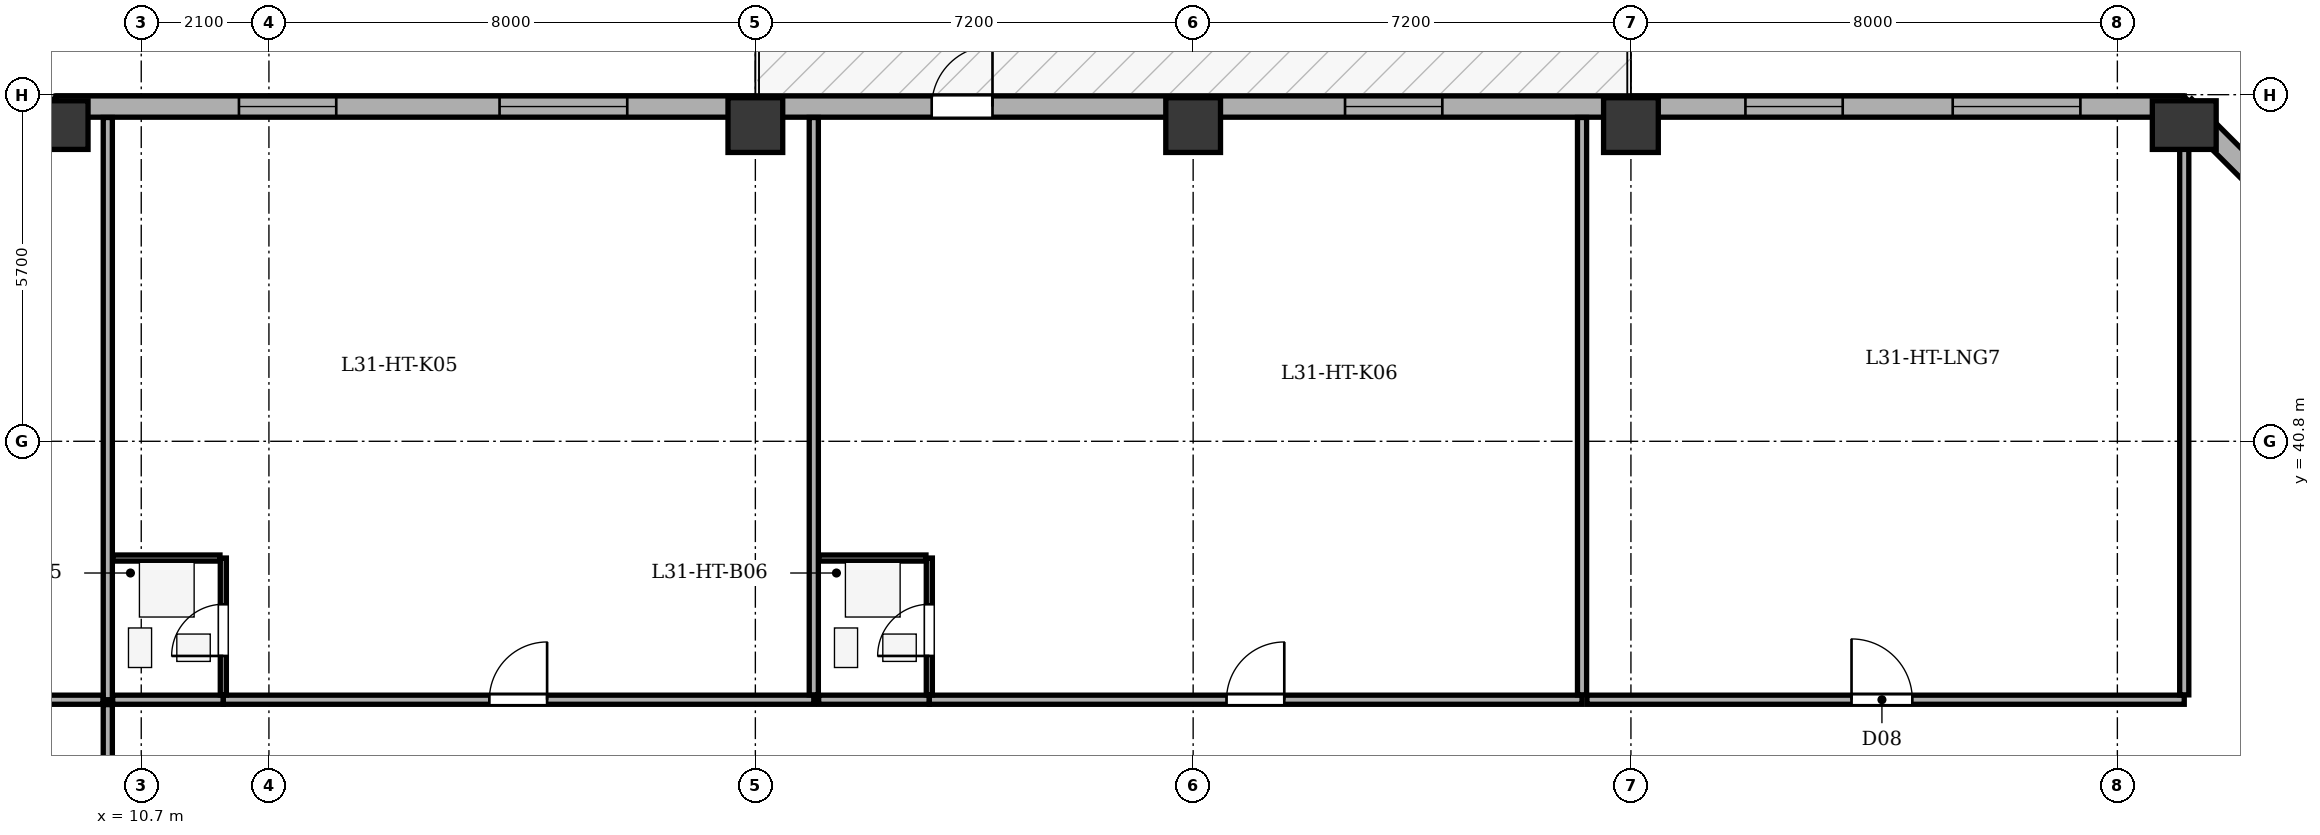
"""IFC4 building model, lengths in metres.
Left out: names, types, materials, properties, quantities, classifications, styles, units other than length and angle.
Written with IfcOpenShell. Run it as: python <this file> out.ifc"""

import sys

from ifc_helpers import new_model, si_unit, direction, frame, frame_2d, origin, origin_2d, place, context, subcontext, project, spatial, rectangle, extrude, element, fill, save


model = new_model("IFC4")
c1 = context("Model", 3, precision=1e-05, world=origin(), true_north=direction((0.0, 1.0)))
c2 = subcontext(c1, "Body", "Model", "MODEL_VIEW")
j1 = project(units=[si_unit("LENGTHUNIT", "METRE"), si_unit("PLANEANGLEUNIT", "RADIAN")], contexts=[c1])
p1 = place(None, origin())
s1 = spatial("IfcSite", under=j1, at=p1, CompositionType="ELEMENT")
p2 = place(p1, origin())
s2 = spatial("IfcBuilding", under=s1, at=p2, CompositionType="ELEMENT")
p3 = place(p2, frame((0.0, 0.0, 127.3)))
s3 = spatial("IfcBuildingStorey", under=s2, at=p3, CompositionType="ELEMENT", Elevation=127.3)
p4 = place(p3, frame((9.3, 46.0, 0.0), z_axis=(0.0, 0.0, 1.0), x_axis=(1.0, 0.0, 0.0)))
e1 = element("IfcColumn", 1, at=p4, inside=s3, PredefinedType="COLUMN", context=c2, shape_type="SweptSolid", body=[
    extrude(rectangle(XDim=0.8, YDim=1.05, at=origin_2d()), origin(), (0.0, 0.0, 1.0), 3.5),
])
for number, where, z_axis, x_axis in (
    (2, (20.8, 46.0, 0.0), (0.0, 0.0, 1.0), (1.0, 0.0, 0.0)),
    (3, (28.0, 46.0, 0.0), (0.0, 0.0, 1.0), (1.0, 0.0, 0.0)),
    (4, (35.2, 46.0, 0.0), (0.0, 0.0, 1.0), (1.0, 0.0, 0.0)),
):
    element("IfcColumn", number, at=place(p3, frame(where, z_axis=z_axis, x_axis=x_axis)), inside=s3, PredefinedType="COLUMN", context=c2, shape_type="SweptSolid", body=[
        extrude(rectangle(XDim=0.9, YDim=0.9, at=origin_2d()), origin(), (0.0, 0.0, 1.0), 3.5),
    ])
p5 = place(p3, frame((44.3, 46.0, 0.0), z_axis=(0.0, 0.0, 1.0), x_axis=(1.0, 0.0, 0.0)))
e5 = element("IfcColumn", 5, at=p5, inside=s3, PredefinedType="COLUMN", context=c2, shape_type="SweptSolid", body=[
    extrude(rectangle(XDim=0.8, YDim=1.05, at=origin_2d()), origin(), (0.0, 0.0, 1.0), 3.5),
])
p6 = place(p3, frame((4.495, 41.5, 0.0), z_axis=(0.0, 0.0, 1.0), x_axis=(0.707106781187, 0.707106781187, 0.0)))
e6 = element("IfcWall", 6, at=p6, inside=s3, PredefinedType="STANDARD", context=c2, shape_type="SweptSolid", body=[
    extrude(rectangle(XDim=6.795, YDim=0.35, at=frame_2d((3.397, 0.0))), origin(), (0.0, 0.0, 1.0), 2.785),
])
p7 = place(p6, frame((2.698, 0.0, 0.75)))
e7 = element("IfcOpeningElement", 7, at=p7, cuts=e6, PredefinedType="OPENING", context=c2, shape_type="SweptSolid", body=[
    extrude(rectangle(XDim=1.4, YDim=1.65, at=frame_2d((0.7, 0.825))), frame((0.0, 0.185, 0.0), z_axis=(0.0, -1.0, 0.0), x_axis=(1.0, 0.0, 0.0)), (0.0, 0.0, 1.0), 0.37),
])
p8 = place(p3, frame((9.3, 46.305, 0.0), z_axis=(0.0, 0.0, 1.0), x_axis=(1.0, 0.0, 0.0)))
e8 = element("IfcWall", 8, at=p8, inside=s3, PredefinedType="STANDARD", context=c2, shape_type="SweptSolid", body=[
    extrude(rectangle(XDim=35.0, YDim=0.35, at=frame_2d((17.5, 0.0))), origin(), (0.0, 0.0, 1.0), 2.785),
])
p9 = place(p8, frame((14.4, 0.0, 0.0)))
e9 = element("IfcOpeningElement", 9, at=p9, cuts=e8, PredefinedType="OPENING", context=c2, shape_type="SweptSolid", body=[
    extrude(rectangle(XDim=1.0, YDim=2.02, at=frame_2d((0.5, 1.01))), frame((0.0, 0.185, 0.0), z_axis=(0.0, -1.0, 0.0), x_axis=(1.0, 0.0, 0.0)), (0.0, 0.0, 1.0), 0.37),
])
p10 = place(p8, frame((3.007, 0.0, 0.75)))
e10 = element("IfcOpeningElement", 10, at=p10, cuts=e8, PredefinedType="OPENING", context=c2, shape_type="SweptSolid", body=[
    extrude(rectangle(XDim=1.6, YDim=1.75, at=frame_2d((0.8, 0.875))), frame((0.0, 0.185, 0.0), z_axis=(0.0, -1.0, 0.0), x_axis=(1.0, 0.0, 0.0)), (0.0, 0.0, 1.0), 0.37),
])
p11 = place(p8, frame((7.293, 0.0, 0.75)))
e11 = element("IfcOpeningElement", 11, at=p11, cuts=e8, PredefinedType="OPENING", context=c2, shape_type="SweptSolid", body=[
    extrude(rectangle(XDim=2.1, YDim=1.75, at=frame_2d((1.05, 0.875))), frame((0.0, 0.185, 0.0), z_axis=(0.0, -1.0, 0.0), x_axis=(1.0, 0.0, 0.0)), (0.0, 0.0, 1.0), 0.37),
])
p12 = place(p8, frame((21.198, 0.0, 0.75)))
e12 = element("IfcOpeningElement", 12, at=p12, cuts=e8, PredefinedType="OPENING", context=c2, shape_type="SweptSolid", body=[
    extrude(rectangle(XDim=1.6, YDim=1.75, at=frame_2d((0.8, 0.875))), frame((0.0, 0.185, 0.0), z_axis=(0.0, -1.0, 0.0), x_axis=(1.0, 0.0, 0.0)), (0.0, 0.0, 1.0), 0.37),
])
p13 = place(p8, frame((27.783, 0.0, 0.75)))
e13 = element("IfcOpeningElement", 13, at=p13, cuts=e8, PredefinedType="OPENING", context=c2, shape_type="SweptSolid", body=[
    extrude(rectangle(XDim=1.6, YDim=1.75, at=frame_2d((0.8, 0.875))), frame((0.0, 0.185, 0.0), z_axis=(0.0, -1.0, 0.0), x_axis=(1.0, 0.0, 0.0)), (0.0, 0.0, 1.0), 0.37),
])
p14 = place(p8, frame((31.192, 0.0, 0.75)))
e14 = element("IfcOpeningElement", 14, at=p14, cuts=e8, PredefinedType="OPENING", context=c2, shape_type="SweptSolid", body=[
    extrude(rectangle(XDim=2.1, YDim=1.75, at=frame_2d((1.05, 0.875))), frame((0.0, 0.185, 0.0), z_axis=(0.0, -1.0, 0.0), x_axis=(1.0, 0.0, 0.0)), (0.0, 0.0, 1.0), 0.37),
])
p15 = place(p3, frame((44.3, 46.305, 0.0), z_axis=(0.0, 0.0, 1.0), x_axis=(0.707106781187, -0.707106781187, 0.0)))
e15 = element("IfcWall", 15, at=p15, inside=s3, PredefinedType="STANDARD", context=c2, shape_type="SweptSolid", body=[
    extrude(rectangle(XDim=6.795, YDim=0.35, at=frame_2d((3.397, 0.0))), origin(), (0.0, 0.0, 1.0), 2.785),
])
p16 = place(p15, frame((2.698, 0.0, 0.75)))
e16 = element("IfcOpeningElement", 16, at=p16, cuts=e15, PredefinedType="OPENING", context=c2, shape_type="SweptSolid", body=[
    extrude(rectangle(XDim=1.4, YDim=1.65, at=frame_2d((0.7, 0.825))), frame((0.0, 0.185, 0.0), z_axis=(0.0, -1.0, 0.0), x_axis=(1.0, 0.0, 0.0)), (0.0, 0.0, 1.0), 0.37),
])
p17 = place(p3, frame((10.15, 36.55, 0.0), z_axis=(0.0, 0.0, 1.0), x_axis=(0.0, 1.0, 0.0)))
e17 = element("IfcWall", 17, at=p17, inside=s3, PredefinedType="PARTITIONING", context=c2, shape_type="SweptSolid", body=[
    extrude(rectangle(XDim=9.575, YDim=0.15, at=frame_2d((4.788, 0.0))), origin(), (0.0, 0.0, 1.0), 3.2),
])
p18 = place(p3, frame((10.23, 36.55, 0.0), z_axis=(0.0, 0.0, 1.0), x_axis=(1.0, 0.0, 0.0)))
e18 = element("IfcWall", 18, at=p18, inside=s3, PredefinedType="PARTITIONING", context=c2, shape_type="SweptSolid", body=[
    extrude(rectangle(XDim=1.82, YDim=0.15, at=frame_2d((0.91, 0.0))), origin(), (0.0, 0.0, 1.0), 3.2),
])
p19 = place(p3, frame((12.05, 36.55, 0.0), z_axis=(0.0, 0.0, 1.0), x_axis=(1.0, 0.0, 0.0)))
e19 = element("IfcWall", 19, at=p19, inside=s3, PredefinedType="PARTITIONING", context=c2, shape_type="SweptSolid", body=[
    extrude(rectangle(XDim=9.711, YDim=0.15, at=frame_2d((4.855, 0.0))), origin(), (0.0, 0.0, 1.0), 3.2),
])
p20 = place(p19, frame((4.375, 0.0, 0.0)))
e20 = element("IfcOpeningElement", 20, at=p20, cuts=e19, PredefinedType="OPENING", context=c2, shape_type="SweptSolid", body=[
    extrude(rectangle(XDim=0.95, YDim=2.1, at=frame_2d((0.475, 1.05))), frame((0.0, 0.085, 0.0), z_axis=(0.0, -1.0, 0.0), x_axis=(1.0, 0.0, 0.0)), (0.0, 0.0, 1.0), 0.17),
])
p21 = place(p3, frame((12.05, 36.63, 0.0), z_axis=(0.0, 0.0, 1.0), x_axis=(0.0, 1.0, 0.0)))
e21 = element("IfcWall", 21, at=p21, inside=s3, PredefinedType="PARTITIONING", context=c2, shape_type="SweptSolid", body=[
    extrude(rectangle(XDim=2.25, YDim=0.1, at=frame_2d((1.125, 0.0))), origin(), (0.0, 0.0, 1.0), 3.2),
])
p22 = place(p21, frame((0.64, 0.0, 0.0)))
e22 = element("IfcOpeningElement", 22, at=p22, cuts=e21, PredefinedType="OPENING", context=c2, shape_type="SweptSolid", body=[
    extrude(rectangle(XDim=0.85, YDim=2.05, at=frame_2d((0.425, 1.025))), frame((0.0, 0.06, 0.0), z_axis=(0.0, -1.0, 0.0), x_axis=(1.0, 0.0, 0.0)), (0.0, 0.0, 1.0), 0.12),
])
p23 = place(p3, frame((10.23, 38.88, 0.0), z_axis=(0.0, 0.0, 1.0), x_axis=(1.0, 0.0, 0.0)))
e23 = element("IfcWall", 23, at=p23, inside=s3, PredefinedType="PARTITIONING", context=c2, shape_type="SweptSolid", body=[
    extrude(rectangle(XDim=1.765, YDim=0.1, at=frame_2d((0.883, 0.0))), origin(), (0.0, 0.0, 1.0), 3.2),
])
p24 = place(p3, frame((21.761, 36.63, 0.0), z_axis=(0.0, 0.0, 1.0), x_axis=(0.0, 1.0, 0.0)))
e24 = element("IfcWall", 24, at=p24, inside=s3, PredefinedType="PARTITIONING", context=c2, shape_type="SweptSolid", body=[
    extrude(rectangle(XDim=9.495, YDim=0.15, at=frame_2d((4.748, 0.0))), origin(), (0.0, 0.0, 1.0), 3.2),
])
p25 = place(p3, frame((21.841, 36.55, 0.0), z_axis=(0.0, 0.0, 1.0), x_axis=(1.0, 0.0, 0.0)))
e25 = element("IfcWall", 25, at=p25, inside=s3, PredefinedType="PARTITIONING", context=c2, shape_type="SweptSolid", body=[
    extrude(rectangle(XDim=1.82, YDim=0.15, at=frame_2d((0.91, 0.0))), origin(), (0.0, 0.0, 1.0), 3.2),
])
p26 = place(p3, frame((23.661, 36.55, 0.0), z_axis=(0.0, 0.0, 1.0), x_axis=(1.0, 0.0, 0.0)))
e26 = element("IfcWall", 26, at=p26, inside=s3, PredefinedType="PARTITIONING", context=c2, shape_type="SweptSolid", body=[
    extrude(rectangle(XDim=10.735, YDim=0.15, at=frame_2d((5.368, 0.0))), origin(), (0.0, 0.0, 1.0), 3.2),
])
p27 = place(p26, frame((4.888, 0.0, 0.0)))
e27 = element("IfcOpeningElement", 27, at=p27, cuts=e26, PredefinedType="OPENING", context=c2, shape_type="SweptSolid", body=[
    extrude(rectangle(XDim=0.95, YDim=2.1, at=frame_2d((0.475, 1.05))), frame((0.0, 0.085, 0.0), z_axis=(0.0, -1.0, 0.0), x_axis=(1.0, 0.0, 0.0)), (0.0, 0.0, 1.0), 0.17),
])
p28 = place(p3, frame((23.661, 36.63, 0.0), z_axis=(0.0, 0.0, 1.0), x_axis=(0.0, 1.0, 0.0)))
e28 = element("IfcWall", 28, at=p28, inside=s3, PredefinedType="PARTITIONING", context=c2, shape_type="SweptSolid", body=[
    extrude(rectangle(XDim=2.25, YDim=0.1, at=frame_2d((1.125, 0.0))), origin(), (0.0, 0.0, 1.0), 3.2),
])
p29 = place(p28, frame((0.64, 0.0, 0.0)))
e29 = element("IfcOpeningElement", 29, at=p29, cuts=e28, PredefinedType="OPENING", context=c2, shape_type="SweptSolid", body=[
    extrude(rectangle(XDim=0.85, YDim=2.05, at=frame_2d((0.425, 1.025))), frame((0.0, 0.06, 0.0), z_axis=(0.0, -1.0, 0.0), x_axis=(1.0, 0.0, 0.0)), (0.0, 0.0, 1.0), 0.12),
])
p30 = place(p3, frame((21.841, 38.88, 0.0), z_axis=(0.0, 0.0, 1.0), x_axis=(1.0, 0.0, 0.0)))
e30 = element("IfcWall", 30, at=p30, inside=s3, PredefinedType="PARTITIONING", context=c2, shape_type="SweptSolid", body=[
    extrude(rectangle(XDim=1.765, YDim=0.1, at=frame_2d((0.882, 0.0))), origin(), (0.0, 0.0, 1.0), 3.2),
])
p31 = place(p3, frame((34.396, 36.63, 0.0), z_axis=(0.0, 0.0, 1.0), x_axis=(0.0, 1.0, 0.0)))
e31 = element("IfcWall", 31, at=p31, inside=s3, PredefinedType="PARTITIONING", context=c2, shape_type="SweptSolid", body=[
    extrude(rectangle(XDim=9.495, YDim=0.15, at=frame_2d((4.748, 0.0))), origin(), (0.0, 0.0, 1.0), 3.2),
])
p32 = place(p3, frame((34.476, 36.55, 0.0), z_axis=(0.0, 0.0, 1.0), x_axis=(1.0, 0.0, 0.0)))
e32 = element("IfcWall", 32, at=p32, inside=s3, PredefinedType="PARTITIONING", context=c2, shape_type="SweptSolid", body=[
    extrude(rectangle(XDim=9.824, YDim=0.15, at=frame_2d((4.912, 0.0))), origin(), (0.0, 0.0, 1.0), 3.2),
])
p33 = place(p32, frame((4.352, 0.0, 0.0)))
e33 = element("IfcOpeningElement", 33, at=p33, cuts=e32, PredefinedType="OPENING", context=c2, shape_type="SweptSolid", body=[
    extrude(rectangle(XDim=1.0, YDim=2.1, at=frame_2d((0.5, 1.05))), frame((0.0, 0.085, 0.0), z_axis=(0.0, -1.0, 0.0), x_axis=(1.0, 0.0, 0.0)), (0.0, 0.0, 1.0), 0.17),
])
p34 = place(p3, frame((44.3, 36.63, 0.0), z_axis=(0.0, 0.0, 1.0), x_axis=(0.0, 1.0, 0.0)))
e34 = element("IfcWall", 34, at=p34, inside=s3, PredefinedType="PARTITIONING", context=c2, shape_type="SweptSolid", body=[
    extrude(rectangle(XDim=9.495, YDim=0.15, at=frame_2d((4.748, 0.0))), origin(), (0.0, 0.0, 1.0), 3.2),
])
p35 = place(p3, frame((4.675, 36.55, 0.0), z_axis=(0.0, 0.0, 1.0), x_axis=(1.0, 0.0, 0.0)))
e35 = element("IfcWall", 35, at=p35, inside=s3, PredefinedType="PARTITIONING", context=c2, shape_type="SweptSolid", body=[
    extrude(rectangle(XDim=5.395, YDim=0.15, at=frame_2d((2.698, 0.0))), origin(), (0.0, 0.0, 1.0), 3.2),
])
p36 = place(p3, frame((10.15, 17.93, 0.0), z_axis=(0.0, 0.0, 1.0), x_axis=(0.0, 1.0, 0.0)))
e36 = element("IfcWall", 36, at=p36, inside=s3, PredefinedType="PARTITIONING", context=c2, shape_type="SweptSolid", body=[
    extrude(rectangle(XDim=18.54, YDim=0.15, at=frame_2d((9.27, 0.0))), origin(), (0.0, 0.0, 1.0), 3.2),
])
p37 = place(p36, frame((8.79, 0.0, 0.0)))
e37 = element("IfcOpeningElement", 37, at=p37, cuts=e36, PredefinedType="OPENING", context=c2, shape_type="SweptSolid", body=[
    extrude(rectangle(XDim=0.95, YDim=2.1, at=frame_2d((0.475, 1.05))), frame((0.0, 0.085, 0.0), z_axis=(0.0, -1.0, 0.0), x_axis=(1.0, 0.0, 0.0)), (0.0, 0.0, 1.0), 0.17),
])
p38 = place(p9, origin())
e38 = element("IfcDoor", 38, at=p38, inside=s3, OperationType="SINGLE_SWING_RIGHT", PredefinedType="DOOR", context=c2, shape_type="SweptSolid", body=[
    extrude(rectangle(XDim=1.0, YDim=2.02, at=frame_2d((0.5, 1.01))), frame((0.0, 0.025, 0.0), z_axis=(0.0, -1.0, 0.0), x_axis=(1.0, 0.0, 0.0)), (0.0, 0.0, 1.0), 0.05),
])
fill(e9, e38)
p39 = place(p10, origin())
e39 = element("IfcWindow", 39, at=p39, inside=s3, PartitioningType="SINGLE_PANEL", PredefinedType="WINDOW", context=c2, shape_type="SweptSolid", body=[
    extrude(rectangle(XDim=1.6, YDim=1.75, at=frame_2d((0.8, 0.875))), frame((0.0, -0.01, 0.0), z_axis=(0.0, -1.0, 0.0), x_axis=(1.0, 0.0, 0.0)), (0.0, 0.0, 1.0), 0.06),
])
fill(e10, e39)
p40 = place(p11, origin())
e40 = element("IfcWindow", 40, at=p40, inside=s3, PartitioningType="SINGLE_PANEL", PredefinedType="WINDOW", context=c2, shape_type="SweptSolid", body=[
    extrude(rectangle(XDim=2.1, YDim=1.75, at=frame_2d((1.05, 0.875))), frame((0.0, -0.01, 0.0), z_axis=(0.0, -1.0, 0.0), x_axis=(1.0, 0.0, 0.0)), (0.0, 0.0, 1.0), 0.06),
])
fill(e11, e40)
p41 = place(p12, origin())
e41 = element("IfcWindow", 41, at=p41, inside=s3, PartitioningType="SINGLE_PANEL", PredefinedType="WINDOW", context=c2, shape_type="SweptSolid", body=[
    extrude(rectangle(XDim=1.6, YDim=1.75, at=frame_2d((0.8, 0.875))), frame((0.0, -0.01, 0.0), z_axis=(0.0, -1.0, 0.0), x_axis=(1.0, 0.0, 0.0)), (0.0, 0.0, 1.0), 0.06),
])
fill(e12, e41)
p42 = place(p13, origin())
e42 = element("IfcWindow", 42, at=p42, inside=s3, PartitioningType="SINGLE_PANEL", PredefinedType="WINDOW", context=c2, shape_type="SweptSolid", body=[
    extrude(rectangle(XDim=1.6, YDim=1.75, at=frame_2d((0.8, 0.875))), frame((0.0, -0.01, 0.0), z_axis=(0.0, -1.0, 0.0), x_axis=(1.0, 0.0, 0.0)), (0.0, 0.0, 1.0), 0.06),
])
fill(e13, e42)
p43 = place(p14, origin())
e43 = element("IfcWindow", 43, at=p43, inside=s3, PartitioningType="SINGLE_PANEL", PredefinedType="WINDOW", context=c2, shape_type="SweptSolid", body=[
    extrude(rectangle(XDim=2.1, YDim=1.75, at=frame_2d((1.05, 0.875))), frame((0.0, -0.01, 0.0), z_axis=(0.0, -1.0, 0.0), x_axis=(1.0, 0.0, 0.0)), (0.0, 0.0, 1.0), 0.06),
])
fill(e14, e43)
p44 = place(p22, origin())
e44 = element("IfcDoor", 44, at=p44, inside=s3, OperationType="SINGLE_SWING_LEFT", PredefinedType="DOOR", context=c2, shape_type="SweptSolid", body=[
    extrude(rectangle(XDim=0.85, YDim=2.05, at=frame_2d((0.425, 1.025))), frame((0.0, 0.025, 0.0), z_axis=(0.0, -1.0, 0.0), x_axis=(1.0, 0.0, 0.0)), (0.0, 0.0, 1.0), 0.05),
])
fill(e22, e44)
p45 = place(p20, origin())
e45 = element("IfcDoor", 45, at=p45, inside=s3, OperationType="SINGLE_SWING_RIGHT", PredefinedType="DOOR", context=c2, shape_type="SweptSolid", body=[
    extrude(rectangle(XDim=0.95, YDim=2.1, at=frame_2d((0.475, 1.05))), frame((0.0, 0.025, 0.0), z_axis=(0.0, -1.0, 0.0), x_axis=(1.0, 0.0, 0.0)), (0.0, 0.0, 1.0), 0.05),
])
fill(e20, e45)
p46 = place(p29, origin())
e46 = element("IfcDoor", 46, at=p46, inside=s3, OperationType="SINGLE_SWING_LEFT", PredefinedType="DOOR", context=c2, shape_type="SweptSolid", body=[
    extrude(rectangle(XDim=0.85, YDim=2.05, at=frame_2d((0.425, 1.025))), frame((0.0, 0.025, 0.0), z_axis=(0.0, -1.0, 0.0), x_axis=(1.0, 0.0, 0.0)), (0.0, 0.0, 1.0), 0.05),
])
fill(e29, e46)
p47 = place(p27, origin())
e47 = element("IfcDoor", 47, at=p47, inside=s3, OperationType="SINGLE_SWING_RIGHT", PredefinedType="DOOR", context=c2, shape_type="SweptSolid", body=[
    extrude(rectangle(XDim=0.95, YDim=2.1, at=frame_2d((0.475, 1.05))), frame((0.0, 0.025, 0.0), z_axis=(0.0, -1.0, 0.0), x_axis=(1.0, 0.0, 0.0)), (0.0, 0.0, 1.0), 0.05),
])
fill(e27, e47)
p48 = place(p33, origin())
e48 = element("IfcDoor", 48, at=p48, inside=s3, OperationType="SINGLE_SWING_LEFT", PredefinedType="DOOR", context=c2, shape_type="SweptSolid", body=[
    extrude(rectangle(XDim=1.0, YDim=2.1, at=frame_2d((0.5, 1.05))), frame((0.0, 0.025, 0.0), z_axis=(0.0, -1.0, 0.0), x_axis=(1.0, 0.0, 0.0)), (0.0, 0.0, 1.0), 0.05),
])
fill(e33, e48)
save(model, sys.argv[1])
